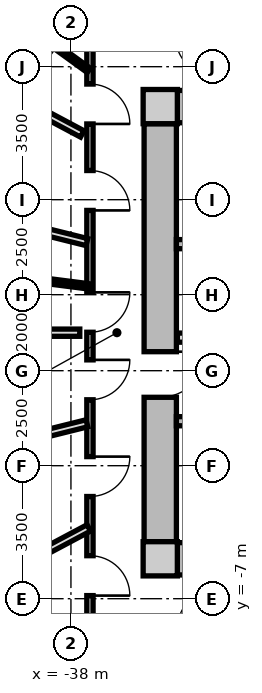
"""IFC4 building model, lengths in metres.
Left out: names, types, materials, properties, quantities, classifications, styles, units other than length and angle.
Written with IfcOpenShell. Run it as: python <this file> out.ifc"""

import sys

from ifc_helpers import new_model, si_unit, direction, frame, frame_2d, origin, origin_2d, place, context, subcontext, project, spatial, rectangle, extrude, source, transform, mapped, element, fill, save


model = new_model("IFC4")
c1 = context("Model", 3, precision=1e-05, world=origin(), true_north=direction((0.0, 1.0)))
c2 = subcontext(c1, "Body", "Model", "MODEL_VIEW")
j1 = project(units=[si_unit("LENGTHUNIT", "METRE"), si_unit("PLANEANGLEUNIT", "RADIAN")], contexts=[c1])
p1 = place(None, origin())
s1 = spatial("IfcSite", under=j1, at=p1, CompositionType="ELEMENT")
p2 = place(p1, origin())
s2 = spatial("IfcBuilding", under=s1, at=p2, CompositionType="ELEMENT")
p3 = place(p2, frame((0.0, 0.0, 39.9)))
s3 = spatial("IfcBuildingStorey", under=s2, at=p3, CompositionType="ELEMENT", Elevation=39.9)
m1 = source(origin(), c2, "Body", "SweptSolid", [
    extrude(rectangle(XDim=0.9, YDim=0.9, at=origin_2d()), origin(), (0.0, 0.0, 1.0), 3.05),
])
for number, where, z_axis, x_axis in (
    (1, (-35.65, -5.95, 0.0), (0.0, 0.0, 1.0), (1.0, 0.0, 0.0)),
    (2, (-35.65, 5.95, 0.0), (0.0, 0.0, 1.0), (1.0, 0.0, 0.0)),
):
    element("IfcColumn", number, at=place(p3, frame(where, z_axis=z_axis, x_axis=x_axis)), inside=s3, PredefinedType="COLUMN", context=c2, shape_type="MappedRepresentation", body=[
        mapped(m1, transform((0.0, 0.0, 0.0), x_axis=(1.0, 0.0, 0.0), y_axis=(0.0, 1.0, 0.0), z_axis=(0.0, 0.0, 1.0), scale=1.0)),
    ])
m2 = source(origin(), c2, "Body", "SweptSolid", [
    extrude(rectangle(XDim=14.4, YDim=0.85, at=frame_2d((7.2, 0.0))), origin(), (0.0, 0.0, 1.0), 2.79),
])
for number, where, z_axis, x_axis in (
    (3, (-35.2, 5.95, 0.0), (0.0, 0.0, 1.0), (1.0, 0.0, 0.0)),
    (4, (-20.8, -5.95, 0.0), (0.0, 0.0, 1.0), (-1.0, 0.0, 0.0)),
):
    element("IfcWall", number, at=place(p3, frame(where, z_axis=z_axis, x_axis=x_axis)), inside=s3, PredefinedType="SHEAR", context=c2, shape_type="MappedRepresentation", body=[
        mapped(m2, transform((0.0, 0.0, 0.0), x_axis=(1.0, 0.0, 0.0), y_axis=(0.0, 1.0, 0.0), z_axis=(0.0, 0.0, 1.0), scale=1.0)),
    ])
m3 = source(origin(), c2, "Body", "SweptSolid", [
    extrude(rectangle(XDim=11.0, YDim=0.85, at=frame_2d((5.5, 0.0))), origin(), (0.0, 0.0, 1.0), 2.79),
])
p4 = place(p3, frame((-35.65, -5.5, 0.0), z_axis=(0.0, 0.0, 1.0), x_axis=(0.0, 1.0, 0.0)))
e5 = element("IfcWall", 5, at=p4, inside=s3, PredefinedType="SHEAR", context=c2, shape_type="MappedRepresentation", body=[
    mapped(m3, transform((0.0, 0.0, 0.0), x_axis=(1.0, 0.0, 0.0), y_axis=(0.0, 1.0, 0.0), z_axis=(0.0, 0.0, 1.0), scale=1.0)),
])
p5 = place(p4, frame((3.8, 0.0, 0.0)))
e6 = element("IfcOpeningElement", 6, at=p5, cuts=e5, PredefinedType="OPENING", context=c2, shape_type="SweptSolid", body=[
    extrude(rectangle(XDim=1.2, YDim=2.15, at=frame_2d((0.6, 1.075))), frame((0.0, 0.435, 0.0), z_axis=(0.0, -1.0, 0.0), x_axis=(1.0, 0.0, 0.0)), (0.0, 0.0, 1.0), 0.87),
])
m4 = source(origin(), c2, "Body", "SweptSolid", [
    extrude(rectangle(XDim=7.765, YDim=0.24, at=frame_2d((3.883, 0.0))), origin(), (0.0, 0.0, 1.0), 2.79),
])
p6 = place(p3, frame((-35.225, 2.33, 0.0), z_axis=(0.0, 0.0, 1.0), x_axis=(1.0, 0.0, 0.0)))
e7 = element("IfcWall", 7, at=p6, inside=s3, PredefinedType="PARTITIONING", context=c2, shape_type="MappedRepresentation", body=[
    mapped(m4, transform((0.0, 0.0, 0.0), x_axis=(1.0, 0.0, 0.0), y_axis=(0.0, 1.0, 0.0), z_axis=(0.0, 0.0, 1.0), scale=1.0)),
])
p7 = place(p3, frame((-35.225, -2.33, 0.0), z_axis=(0.0, 0.0, 1.0), x_axis=(1.0, 0.0, 0.0)))
e8 = element("IfcWall", 8, at=p7, inside=s3, PredefinedType="PARTITIONING", context=c2, shape_type="MappedRepresentation", body=[
    mapped(m4, transform((0.0, 0.0, 0.0), x_axis=(1.0, 0.0, 0.0), y_axis=(0.0, 1.0, 0.0), z_axis=(0.0, 0.0, 1.0), scale=1.0)),
])
p8 = place(p7, frame((0.885, 0.0, 0.0)))
e9 = element("IfcOpeningElement", 9, at=p8, cuts=e8, PredefinedType="OPENING", context=c2, shape_type="SweptSolid", body=[
    extrude(rectangle(XDim=1.1, YDim=2.15, at=frame_2d((0.55, 1.075))), frame((0.0, 0.13, 0.0), z_axis=(0.0, -1.0, 0.0), x_axis=(1.0, 0.0, 0.0)), (0.0, 0.0, 1.0), 0.26),
])
m5 = source(origin(), c2, "Body", "SweptSolid", [
    extrude(rectangle(XDim=7.62, YDim=0.24, at=frame_2d((3.81, 0.0))), origin(), (0.0, 0.0, 1.0), 2.775),
])
p9 = place(p3, frame((-35.2, -0.13, 0.0), z_axis=(0.0, 0.0, 1.0), x_axis=(1.0, 0.0, 0.0)))
e10 = element("IfcWall", 10, at=p9, inside=s3, PredefinedType="PARTITIONING", context=c2, shape_type="MappedRepresentation", body=[
    mapped(m5, transform((0.0, 0.0, 0.0), x_axis=(1.0, 0.0, 0.0), y_axis=(0.0, 1.0, 0.0), z_axis=(0.0, 0.0, 1.0), scale=1.0)),
])
p10 = place(p9, frame((6.22, 0.0, 0.0)))
e11 = element("IfcOpeningElement", 11, at=p10, cuts=e10, PredefinedType="OPENING", context=c2, shape_type="SweptSolid", body=[
    extrude(rectangle(XDim=1.0, YDim=2.1, at=frame_2d((0.5, 1.05))), frame((0.0, 0.13, 0.0), z_axis=(0.0, -1.0, 0.0), x_axis=(1.0, 0.0, 0.0)), (0.0, 0.0, 1.0), 0.26),
])
p11 = place(p9, frame((0.85, 0.0, 0.0)))
e12 = element("IfcOpeningElement", 12, at=p11, cuts=e10, PredefinedType="OPENING", context=c2, shape_type="SweptSolid", body=[
    extrude(rectangle(XDim=1.1, YDim=2.2, at=frame_2d((0.55, 1.1))), frame((0.0, 0.13, 0.0), z_axis=(0.0, -1.0, 0.0), x_axis=(1.0, 0.0, 0.0)), (0.0, 0.0, 1.0), 0.26),
])
p12 = place(p9, frame((3.85, 0.0, 0.0)))
e13 = element("IfcOpeningElement", 13, at=p12, cuts=e10, PredefinedType="OPENING", context=c2, shape_type="SweptSolid", body=[
    extrude(rectangle(XDim=1.1, YDim=2.2, at=frame_2d((0.55, 1.1))), frame((0.0, 0.13, 0.0), z_axis=(0.0, -1.0, 0.0), x_axis=(1.0, 0.0, 0.0)), (0.0, 0.0, 1.0), 0.26),
])
m6 = source(origin(), c2, "Body", "SweptSolid", [
    extrude(rectangle(XDim=15.6, YDim=0.165, at=frame_2d((7.8, 0.0))), origin(), (0.0, 0.0, 1.0), 2.775),
])
p13 = place(p3, frame((-37.5, -7.8, 0.0), z_axis=(0.0, 0.0, 1.0), x_axis=(0.0, 1.0, 0.0)))
e14 = element("IfcWall", 14, at=p13, inside=s3, PredefinedType="PARTITIONING", context=c2, shape_type="MappedRepresentation", body=[
    mapped(m6, transform((0.0, 0.0, 0.0), x_axis=(1.0, 0.0, 0.0), y_axis=(0.0, 1.0, 0.0), z_axis=(0.0, 0.0, 1.0), scale=1.0)),
])
p14 = place(p13, frame((13.293, 0.0, 0.0)))
e15 = element("IfcOpeningElement", 15, at=p14, cuts=e14, PredefinedType="OPENING", context=c2, shape_type="SweptSolid", body=[
    extrude(rectangle(XDim=1.05, YDim=2.15, at=frame_2d((0.525, 1.075))), frame((0.0, 0.093, 0.0), z_axis=(0.0, -1.0, 0.0), x_axis=(1.0, 0.0, 0.0)), (0.0, 0.0, 1.0), 0.185),
])
p15 = place(p13, frame((11.018, 0.0, 0.0)))
e16 = element("IfcOpeningElement", 16, at=p15, cuts=e14, PredefinedType="OPENING", context=c2, shape_type="SweptSolid", body=[
    extrude(rectangle(XDim=1.05, YDim=2.15, at=frame_2d((0.525, 1.075))), frame((0.0, 0.093, 0.0), z_axis=(0.0, -1.0, 0.0), x_axis=(1.0, 0.0, 0.0)), (0.0, 0.0, 1.0), 0.185),
])
p16 = place(p13, frame((7.812, 0.0, 0.0)))
e17 = element("IfcOpeningElement", 17, at=p16, cuts=e14, PredefinedType="OPENING", context=c2, shape_type="SweptSolid", body=[
    extrude(rectangle(XDim=1.05, YDim=2.15, at=frame_2d((0.525, 1.075))), frame((0.0, 0.093, 0.0), z_axis=(0.0, -1.0, 0.0), x_axis=(1.0, 0.0, 0.0)), (0.0, 0.0, 1.0), 0.185),
])
p17 = place(p13, frame((6.035, 0.0, 0.0)))
e18 = element("IfcOpeningElement", 18, at=p17, cuts=e14, PredefinedType="OPENING", context=c2, shape_type="SweptSolid", body=[
    extrude(rectangle(XDim=1.05, YDim=2.15, at=frame_2d((0.525, 1.075))), frame((0.0, 0.093, 0.0), z_axis=(0.0, -1.0, 0.0), x_axis=(1.0, 0.0, 0.0)), (0.0, 0.0, 1.0), 0.185),
])
p18 = place(p13, frame((3.489, 0.0, 0.0)))
e19 = element("IfcOpeningElement", 19, at=p18, cuts=e14, PredefinedType="OPENING", context=c2, shape_type="SweptSolid", body=[
    extrude(rectangle(XDim=1.05, YDim=2.15, at=frame_2d((0.525, 1.075))), frame((0.0, 0.093, 0.0), z_axis=(0.0, -1.0, 0.0), x_axis=(1.0, 0.0, 0.0)), (0.0, 0.0, 1.0), 0.185),
])
p19 = place(p13, frame((0.882, 0.0, 0.0)))
e20 = element("IfcOpeningElement", 20, at=p19, cuts=e14, PredefinedType="OPENING", context=c2, shape_type="SweptSolid", body=[
    extrude(rectangle(XDim=1.05, YDim=2.15, at=frame_2d((0.525, 1.075))), frame((0.0, 0.093, 0.0), z_axis=(0.0, -1.0, 0.0), x_axis=(1.0, 0.0, 0.0)), (0.0, 0.0, 1.0), 0.185),
])
m7 = source(origin(), c2, "Body", "SweptSolid", [
    extrude(rectangle(XDim=9.737, YDim=0.19, at=frame_2d((4.869, 0.0))), origin(), (0.0, 0.0, 1.0), 2.225),
])
p20 = place(p3, frame((-37.58, 2.385, 0.0), z_axis=(0.0, 0.0, 1.0), x_axis=(-0.970392716238, 0.241532557375, 0.0)))
e21 = element("IfcWall", 21, at=p20, inside=s3, PredefinedType="PARTITIONING", context=c2, shape_type="MappedRepresentation", body=[
    mapped(m7, transform((0.0, 0.0, 0.0), x_axis=(1.0, 0.0, 0.0), y_axis=(0.0, 1.0, 0.0), z_axis=(0.0, 0.0, 1.0), scale=1.0)),
])
m8 = source(origin(), c2, "Body", "SweptSolid", [
    extrude(rectangle(XDim=7.677, YDim=0.19, at=frame_2d((3.838, 0.0))), origin(), (0.0, 0.0, 1.0), 2.775),
])
p21 = place(p3, frame((-37.703, 5.231, 0.0), z_axis=(0.0, 0.0, 1.0), x_axis=(-0.882725057546, 0.469889851753, 0.0)))
e22 = element("IfcWall", 22, at=p21, inside=s3, PredefinedType="PARTITIONING", context=c2, shape_type="MappedRepresentation", body=[
    mapped(m8, transform((0.0, 0.0, 0.0), x_axis=(1.0, 0.0, 0.0), y_axis=(0.0, 1.0, 0.0), z_axis=(0.0, 0.0, 1.0), scale=1.0)),
])
m9 = source(origin(), c2, "Body", "SweptSolid", [
    extrude(rectangle(XDim=3.051, YDim=0.14, at=frame_2d((1.525, 0.0))), origin(), (0.0, 0.0, 1.0), 2.775),
])
p22 = place(p3, frame((-37.53, 6.903, 0.0), z_axis=(0.0, 0.0, 1.0), x_axis=(-0.809849031404, 0.586638343729, 0.0)))
e23 = element("IfcWall", 23, at=p22, inside=s3, PredefinedType="PARTITIONING", context=c2, shape_type="MappedRepresentation", body=[
    mapped(m9, transform((0.0, 0.0, 0.0), x_axis=(1.0, 0.0, 0.0), y_axis=(0.0, 1.0, 0.0), z_axis=(0.0, 0.0, 1.0), scale=1.0)),
])
p23 = place(p22, frame((1.065, 0.0, 0.0)))
e24 = element("IfcOpeningElement", 24, at=p23, cuts=e23, PredefinedType="OPENING", context=c2, shape_type="SweptSolid", body=[
    extrude(rectangle(XDim=0.92, YDim=2.1, at=frame_2d((0.46, 1.05))), frame((0.0, 0.08, 0.0), z_axis=(0.0, -1.0, 0.0), x_axis=(1.0, 0.0, 0.0)), (0.0, 0.0, 1.0), 0.16),
])
p24 = place(p3, frame((-37.58, -2.385, 0.0), z_axis=(0.0, 0.0, 1.0), x_axis=(-0.970392716238, -0.241532557375, 0.0)))
e25 = element("IfcWall", 25, at=p24, inside=s3, PredefinedType="PARTITIONING", context=c2, shape_type="MappedRepresentation", body=[
    mapped(m7, transform((0.0, 0.0, 0.0), x_axis=(1.0, 0.0, 0.0), y_axis=(0.0, 1.0, 0.0), z_axis=(0.0, 0.0, 1.0), scale=1.0)),
])
m10 = source(origin(), c2, "Body", "SweptSolid", [
    extrude(rectangle(XDim=9.261, YDim=0.19, at=frame_2d((4.631, 0.0))), origin(), (0.0, 0.0, 1.0), 2.775),
])
p25 = place(p3, frame((-37.767, 0.0, 0.0), z_axis=(0.0, 0.0, 1.0), x_axis=(-1.0, 0.0, 0.0)))
e26 = element("IfcWall", 26, at=p25, inside=s3, PredefinedType="PARTITIONING", context=c2, shape_type="MappedRepresentation", body=[
    mapped(m10, transform((0.0, 0.0, 0.0), x_axis=(1.0, 0.0, 0.0), y_axis=(0.0, 1.0, 0.0), z_axis=(0.0, 0.0, 1.0), scale=1.0)),
])
m11 = source(origin(), c2, "Body", "SweptSolid", [
    extrude(rectangle(XDim=4.21, YDim=0.14, at=frame_2d((2.105, 0.0))), origin(), (0.0, 0.0, 1.0), 2.775),
])
p26 = place(p3, frame((-37.53, 1.219, 0.0), z_axis=(0.0, 0.0, 1.0), x_axis=(-0.991917821325, 0.126881975625, 0.0)))
e27 = element("IfcWall", 27, at=p26, inside=s3, PredefinedType="PARTITIONING", context=c2, shape_type="MappedRepresentation", body=[
    mapped(m11, transform((0.0, 0.0, 0.0), x_axis=(1.0, 0.0, 0.0), y_axis=(0.0, 1.0, 0.0), z_axis=(0.0, 0.0, 1.0), scale=1.0)),
])
p27 = place(p26, frame((1.645, 0.0, 0.0)))
e28 = element("IfcOpeningElement", 28, at=p27, cuts=e27, PredefinedType="OPENING", context=c2, shape_type="SweptSolid", body=[
    extrude(rectangle(XDim=0.92, YDim=2.1, at=frame_2d((0.46, 1.05))), frame((0.0, 0.08, 0.0), z_axis=(0.0, -1.0, 0.0), x_axis=(1.0, 0.0, 0.0)), (0.0, 0.0, 1.0), 0.16),
])
m12 = source(origin(), c2, "Body", "SweptSolid", [
    extrude(rectangle(XDim=7.873, YDim=0.19, at=frame_2d((3.937, 0.0))), origin(), (0.0, 0.0, 1.0), 2.775),
])
p28 = place(p3, frame((-37.53, -5.138, 0.0), z_axis=(0.0, 0.0, 1.0), x_axis=(-0.882666052726, -0.470000680175, 0.0)))
e29 = element("IfcWall", 29, at=p28, inside=s3, PredefinedType="PARTITIONING", context=c2, shape_type="MappedRepresentation", body=[
    mapped(m12, transform((0.0, 0.0, 0.0), x_axis=(1.0, 0.0, 0.0), y_axis=(0.0, 1.0, 0.0), z_axis=(0.0, 0.0, 1.0), scale=1.0)),
])
m13 = source(origin(), c2, "Body", "SweptSolid", [
    extrude(rectangle(XDim=1.2, YDim=2.15, at=frame_2d((0.6, 1.075))), frame((0.0, 0.025, 0.0), z_axis=(0.0, -1.0, 0.0), x_axis=(1.0, 0.0, 0.0)), (0.0, 0.0, 1.0), 0.05),
])
p29 = place(p5, frame((1.2, 0.0, 0.0), z_axis=(0.0, 0.0, 1.0), x_axis=(-1.0, 0.0, 0.0)))
e30 = element("IfcDoor", 30, at=p29, inside=s3, OperationType="SINGLE_SWING_LEFT", PredefinedType="DOOR", context=c2, shape_type="MappedRepresentation", body=[
    mapped(m13, transform((0.0, 0.0, 0.0), x_axis=(1.0, 0.0, 0.0), y_axis=(0.0, 1.0, 0.0), z_axis=(0.0, 0.0, 1.0), scale=1.0)),
])
fill(e6, e30)
m14 = source(origin(), c2, "Body", "SweptSolid", [
    extrude(rectangle(XDim=1.05, YDim=2.15, at=frame_2d((0.525, 1.075))), frame((0.0, 0.025, 0.0), z_axis=(0.0, -1.0, 0.0), x_axis=(1.0, 0.0, 0.0)), (0.0, 0.0, 1.0), 0.05),
])
p30 = place(p14, frame((1.05, 0.0, 0.0), z_axis=(0.0, 0.0, 1.0), x_axis=(-1.0, 0.0, 0.0)))
e31 = element("IfcDoor", 31, at=p30, inside=s3, OperationType="SINGLE_SWING_RIGHT", PredefinedType="DOOR", context=c2, shape_type="MappedRepresentation", body=[
    mapped(m14, transform((0.0, 0.0, 0.0), x_axis=(1.0, 0.0, 0.0), y_axis=(0.0, 1.0, 0.0), z_axis=(0.0, 0.0, 1.0), scale=1.0)),
])
fill(e15, e31)
p31 = place(p15, frame((1.05, 0.0, 0.0), z_axis=(0.0, 0.0, 1.0), x_axis=(-1.0, 0.0, 0.0)))
e32 = element("IfcDoor", 32, at=p31, inside=s3, OperationType="SINGLE_SWING_RIGHT", PredefinedType="DOOR", context=c2, shape_type="MappedRepresentation", body=[
    mapped(m14, transform((0.0, 0.0, 0.0), x_axis=(1.0, 0.0, 0.0), y_axis=(0.0, 1.0, 0.0), z_axis=(0.0, 0.0, 1.0), scale=1.0)),
])
fill(e16, e32)
p32 = place(p16, frame((1.05, 0.0, 0.0), z_axis=(0.0, 0.0, 1.0), x_axis=(-1.0, 0.0, 0.0)))
e33 = element("IfcDoor", 33, at=p32, inside=s3, OperationType="SINGLE_SWING_LEFT", PredefinedType="DOOR", context=c2, shape_type="MappedRepresentation", body=[
    mapped(m14, transform((0.0, 0.0, 0.0), x_axis=(1.0, 0.0, 0.0), y_axis=(0.0, 1.0, 0.0), z_axis=(0.0, 0.0, 1.0), scale=1.0)),
])
fill(e17, e33)
p33 = place(p17, frame((1.05, 0.0, 0.0), z_axis=(0.0, 0.0, 1.0), x_axis=(-1.0, 0.0, 0.0)))
e34 = element("IfcDoor", 34, at=p33, inside=s3, OperationType="SINGLE_SWING_LEFT", PredefinedType="DOOR", context=c2, shape_type="MappedRepresentation", body=[
    mapped(m14, transform((0.0, 0.0, 0.0), x_axis=(1.0, 0.0, 0.0), y_axis=(0.0, 1.0, 0.0), z_axis=(0.0, 0.0, 1.0), scale=1.0)),
])
fill(e18, e34)
p34 = place(p18, frame((1.05, 0.0, 0.0), z_axis=(0.0, 0.0, 1.0), x_axis=(-1.0, 0.0, 0.0)))
e35 = element("IfcDoor", 35, at=p34, inside=s3, OperationType="SINGLE_SWING_LEFT", PredefinedType="DOOR", context=c2, shape_type="MappedRepresentation", body=[
    mapped(m14, transform((0.0, 0.0, 0.0), x_axis=(1.0, 0.0, 0.0), y_axis=(0.0, 1.0, 0.0), z_axis=(0.0, 0.0, 1.0), scale=1.0)),
])
fill(e19, e35)
p35 = place(p19, frame((1.05, 0.0, 0.0), z_axis=(0.0, 0.0, 1.0), x_axis=(-1.0, 0.0, 0.0)))
e36 = element("IfcDoor", 36, at=p35, inside=s3, OperationType="SINGLE_SWING_RIGHT", PredefinedType="DOOR", context=c2, shape_type="MappedRepresentation", body=[
    mapped(m14, transform((0.0, 0.0, 0.0), x_axis=(1.0, 0.0, 0.0), y_axis=(0.0, 1.0, 0.0), z_axis=(0.0, 0.0, 1.0), scale=1.0)),
])
fill(e20, e36)
save(model, sys.argv[1])
